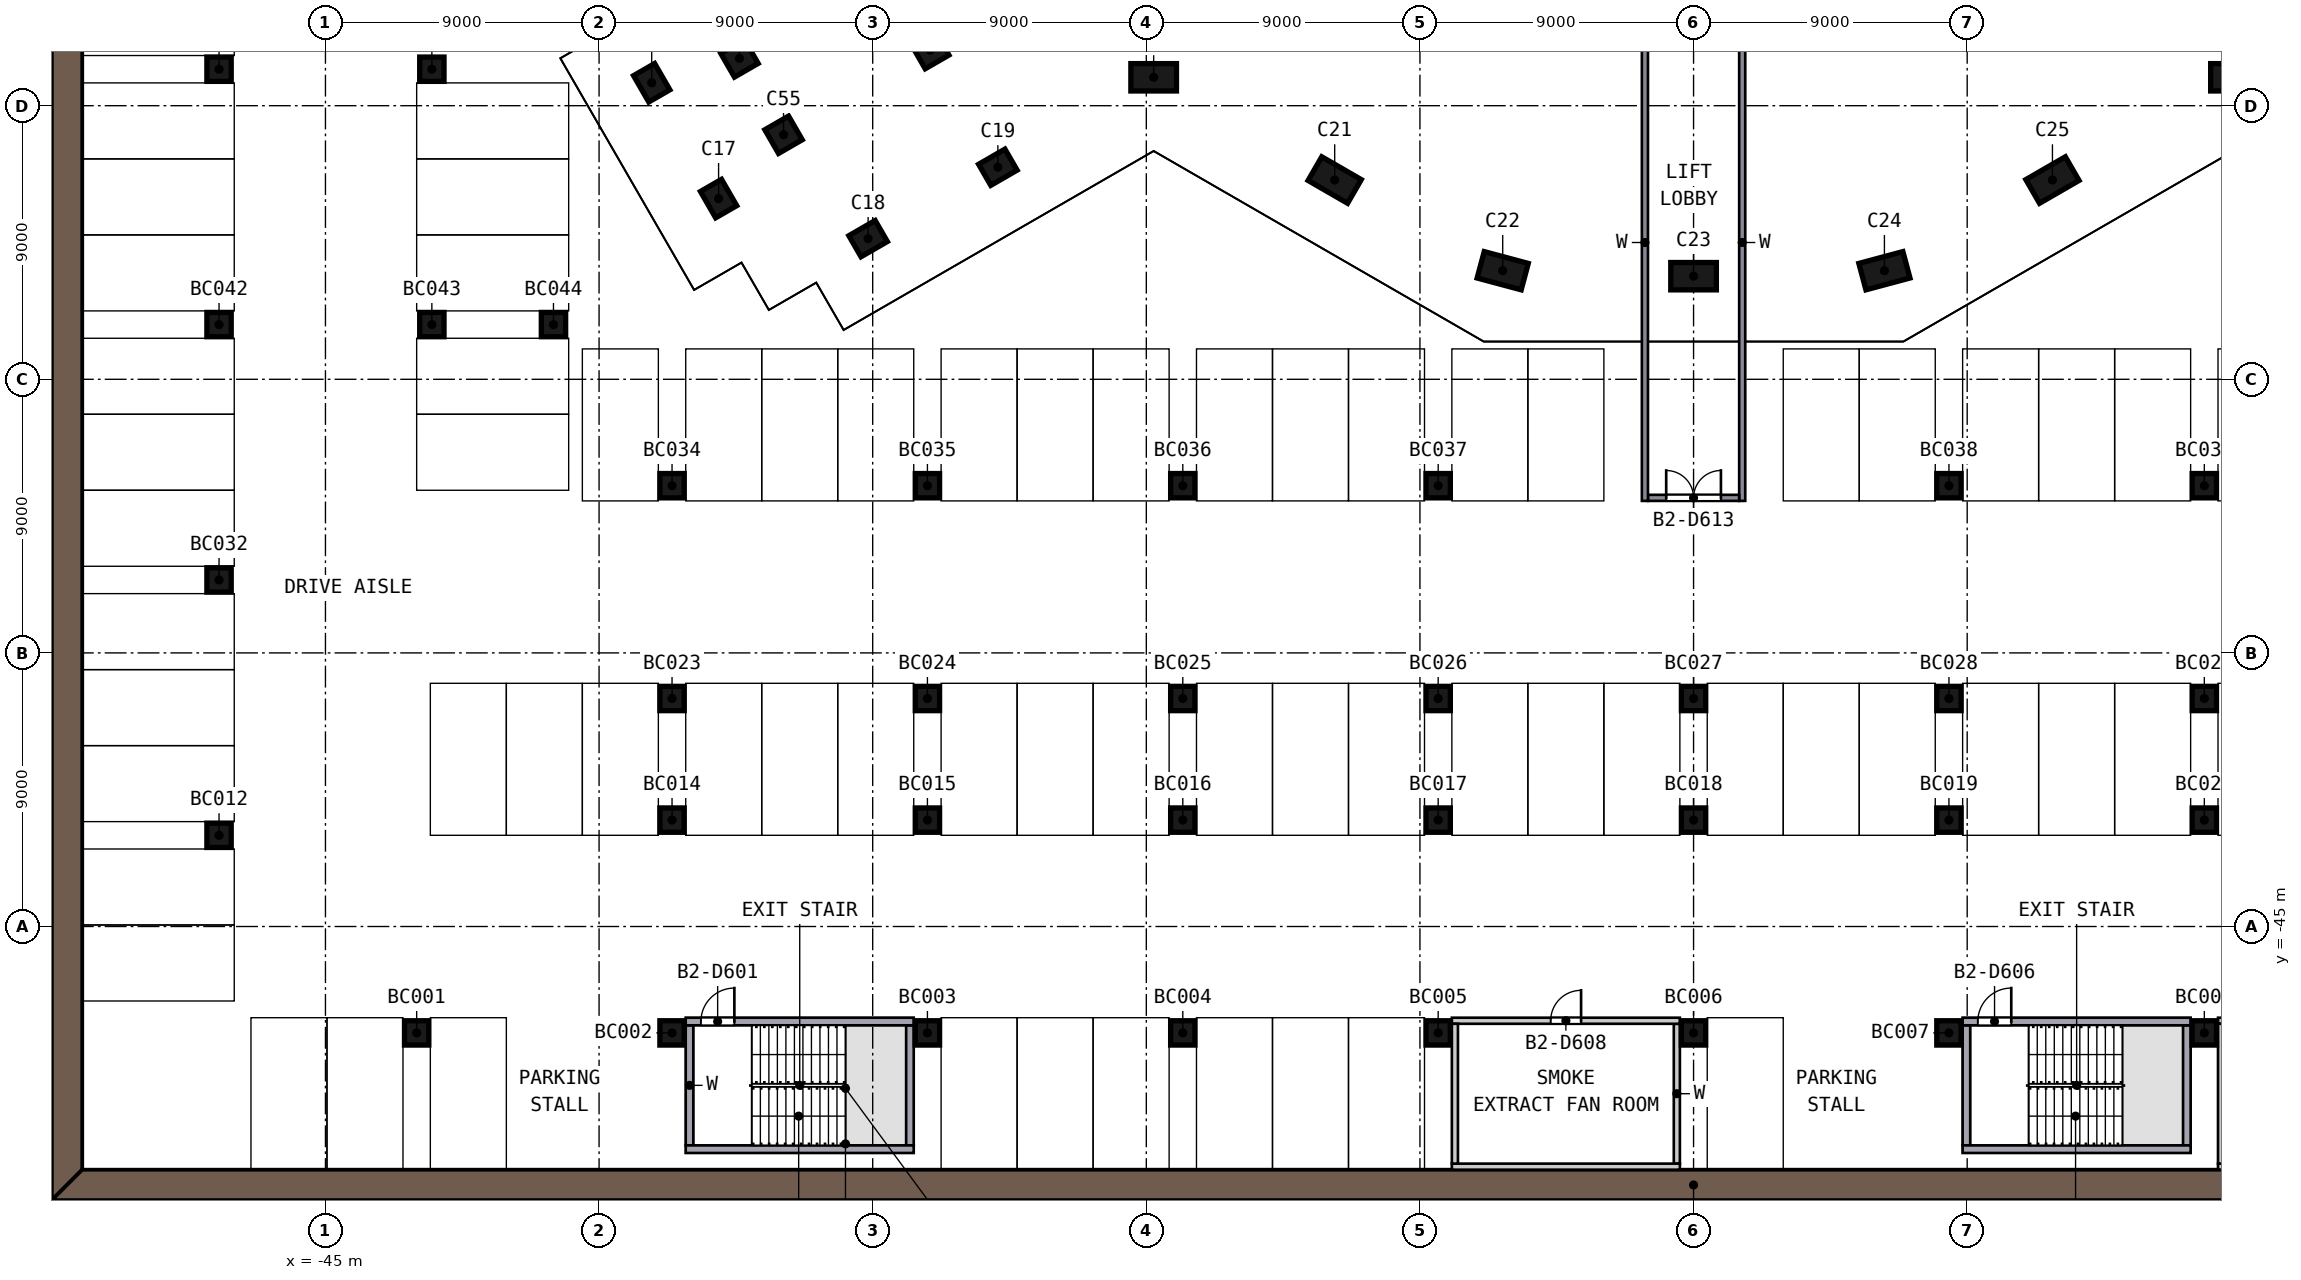
"""IFC4 building model, lengths in metres.
Left out: names, types, materials, properties, quantities, classifications, styles, units other than length and angle.
Written with IfcOpenShell. Run it as: python <this file> out.ifc"""

import sys

from ifc_helpers import new_model, si_unit, direction, frame, frame_2d, origin, origin_2d, place, context, subcontext, project, spatial, polyline, rectangle, outline, extrude, element, fill, save


model = new_model("IFC4")
c1 = context("Model", 3, precision=1e-05, world=origin(), true_north=direction((0.0, 1.0)))
c2 = subcontext(c1, "Body", "Model", "MODEL_VIEW")
j1 = project(units=[si_unit("LENGTHUNIT", "METRE"), si_unit("PLANEANGLEUNIT", "RADIAN")], contexts=[c1])
p1 = place(None, origin())
s1 = spatial("IfcSite", under=j1, at=p1, CompositionType="ELEMENT")
p2 = place(p1, origin())
s2 = spatial("IfcBuilding", under=s1, at=p2, CompositionType="ELEMENT")
p3 = place(p2, frame((0.0, 0.0, -7.8)))
s3 = spatial("IfcBuildingStorey", under=s2, at=p3, CompositionType="ELEMENT", Elevation=-7.8)
for number, where, z_axis, x_axis in (
    (1, (-34.269, -17.245, 0.0), (0.0, 0.0, 1.0), (0.5, -0.866, 0.0)),
    (2, (-32.069, -21.055, 0.0), (0.0, 0.0, 1.0), (0.5, -0.866, 0.0)),
    (3, (-27.151, -22.373, 0.0), (0.0, 0.0, 1.0), (0.866, 0.5, 0.0)),
    (4, (-22.883, -20.024, 0.0), (0.0, 0.0, 1.0), (0.866, 0.5, 0.0)),
):
    element("IfcColumn", number, at=place(p3, frame(where, z_axis=z_axis, x_axis=x_axis)), inside=s3, PredefinedType="COLUMN", context=c2, shape_type="SweptSolid", body=[
        extrude(rectangle(XDim=1.0, YDim=0.8, at=origin_2d()), origin(), (0.0, 0.0, 1.0), 3.45),
    ])
for number, where, z_axis, x_axis in (
    (5, (-17.758, -17.065, 0.0), (0.0, 0.0, 1.0), (-1.0, 0.0, 0.0)),
    (6, (-11.804, -20.445, 0.0), (0.0, 0.0, 1.0), (0.866, -0.5, 0.0)),
    (7, (-6.278, -23.428, 0.0), (0.0, 0.0, 1.0), (-0.966, 0.259, 0.0)),
    (8, (0.0, -23.608, 0.0), (0.0, 0.0, 1.0), (1.0, 0.0, 0.0)),
    (9, (6.278, -23.428, 0.0), (0.0, 0.0, 1.0), (-0.966, -0.259, 0.0)),
    (10, (11.804, -20.445, 0.0), (0.0, 0.0, 1.0), (0.866, 0.5, 0.0)),
    (11, (17.758, -17.065, 0.0), (0.0, 0.0, 1.0), (-1.0, 0.0, 0.0)),
):
    element("IfcColumn", number, at=place(p3, frame(where, z_axis=z_axis, x_axis=x_axis)), inside=s3, PredefinedType="COLUMN", context=c2, shape_type="SweptSolid", body=[
        extrude(rectangle(XDim=1.5, YDim=0.9, at=origin_2d()), origin(), (0.0, 0.0, 1.0), 3.45),
    ])
for number, where, z_axis, x_axis in (
    (12, (-25.108, -16.17, 0.0), (0.0, 0.0, 1.0), (-0.866, -0.5, 0.0)),
    (13, (-31.382, -16.444, 0.0), (0.0, 0.0, 1.0), (-0.866, -0.5, 0.0)),
    (14, (-29.932, -18.956, 0.0), (0.0, 0.0, 1.0), (-0.866, -0.5, 0.0)),
):
    element("IfcColumn", number, at=place(p3, frame(where, z_axis=z_axis, x_axis=x_axis)), inside=s3, PredefinedType="COLUMN", context=c2, shape_type="SweptSolid", body=[
        extrude(rectangle(XDim=0.9, YDim=0.9, at=origin_2d()), origin(), (0.0, 0.0, 1.0), 3.45),
    ])
p4 = place(p3, origin())
e15 = element("IfcWall", 15, at=p4, inside=s3, PredefinedType="SOLIDWALL", context=c2, shape_type="SweptSolid", body=[
    extrude(outline(polyline([(-54.0, 54.0), (-54.0, -54.0), (-53.0, -53.0), (-53.0, 53.0), (-54.0, 54.0)])), origin(), (0.0, 0.0, 1.0), 3.9),
])
p5 = place(p3, origin())
e16 = element("IfcWall", 16, at=p5, inside=s3, PredefinedType="SOLIDWALL", context=c2, shape_type="SweptSolid", body=[
    extrude(outline(polyline([(-54.0, -54.0), (54.0, -54.0), (53.0, -53.0), (-53.0, -53.0), (-54.0, -54.0)])), origin(), (0.0, 0.0, 1.0), 3.9),
])
for number, where, z_axis, x_axis in (
    (17, (-42.0, -48.5, 0.0), (0.0, 0.0, 1.0), (1.0, 0.0, 0.0)),
    (18, (-33.6, -48.5, 0.0), (0.0, 0.0, 1.0), (1.0, 0.0, 0.0)),
    (19, (-25.2, -48.5, 0.0), (0.0, 0.0, 1.0), (1.0, 0.0, 0.0)),
    (20, (-16.8, -48.5, 0.0), (0.0, 0.0, 1.0), (1.0, 0.0, 0.0)),
    (21, (-8.4, -48.5, 0.0), (0.0, 0.0, 1.0), (1.0, 0.0, 0.0)),
    (22, (0.0, -48.5, 0.0), (0.0, 0.0, 1.0), (1.0, 0.0, 0.0)),
    (23, (8.4, -48.5, 0.0), (0.0, 0.0, 1.0), (1.0, 0.0, 0.0)),
    (24, (16.8, -48.5, 0.0), (0.0, 0.0, 1.0), (1.0, 0.0, 0.0)),
    (25, (-48.5, -42.0, 0.0), (0.0, 0.0, 1.0), (1.0, 0.0, 0.0)),
    (26, (-33.6, -41.5, 0.0), (0.0, 0.0, 1.0), (1.0, 0.0, 0.0)),
    (27, (-25.2, -41.5, 0.0), (0.0, 0.0, 1.0), (1.0, 0.0, 0.0)),
    (28, (-16.8, -41.5, 0.0), (0.0, 0.0, 1.0), (1.0, 0.0, 0.0)),
    (29, (-8.4, -41.5, 0.0), (0.0, 0.0, 1.0), (1.0, 0.0, 0.0)),
    (30, (0.0, -41.5, 0.0), (0.0, 0.0, 1.0), (1.0, 0.0, 0.0)),
    (31, (8.4, -41.5, 0.0), (0.0, 0.0, 1.0), (1.0, 0.0, 0.0)),
    (32, (16.8, -41.5, 0.0), (0.0, 0.0, 1.0), (1.0, 0.0, 0.0)),
    (33, (-33.6, -37.5, 0.0), (0.0, 0.0, 1.0), (1.0, 0.0, 0.0)),
    (34, (-25.2, -37.5, 0.0), (0.0, 0.0, 1.0), (1.0, 0.0, 0.0)),
    (35, (-16.8, -37.5, 0.0), (0.0, 0.0, 1.0), (1.0, 0.0, 0.0)),
    (36, (-8.4, -37.5, 0.0), (0.0, 0.0, 1.0), (1.0, 0.0, 0.0)),
    (37, (0.0, -37.5, 0.0), (0.0, 0.0, 1.0), (1.0, 0.0, 0.0)),
    (38, (8.4, -37.5, 0.0), (0.0, 0.0, 1.0), (1.0, 0.0, 0.0)),
    (39, (16.8, -37.5, 0.0), (0.0, 0.0, 1.0), (1.0, 0.0, 0.0)),
    (40, (-48.5, -33.6, 0.0), (0.0, 0.0, 1.0), (1.0, 0.0, 0.0)),
    (41, (-33.6, -30.5, 0.0), (0.0, 0.0, 1.0), (1.0, 0.0, 0.0)),
    (42, (-25.2, -30.5, 0.0), (0.0, 0.0, 1.0), (1.0, 0.0, 0.0)),
    (43, (-16.8, -30.5, 0.0), (0.0, 0.0, 1.0), (1.0, 0.0, 0.0)),
    (44, (-8.4, -30.5, 0.0), (0.0, 0.0, 1.0), (1.0, 0.0, 0.0)),
    (45, (8.4, -30.5, 0.0), (0.0, 0.0, 1.0), (1.0, 0.0, 0.0)),
    (46, (16.8, -30.5, 0.0), (0.0, 0.0, 1.0), (1.0, 0.0, 0.0)),
    (47, (-48.5, -25.2, 0.0), (0.0, 0.0, 1.0), (1.0, 0.0, 0.0)),
    (48, (-41.5, -25.2, 0.0), (0.0, 0.0, 1.0), (1.0, 0.0, 0.0)),
    (49, (-37.5, -25.2, 0.0), (0.0, 0.0, 1.0), (1.0, 0.0, 0.0)),
    (50, (-48.5, -16.8, 0.0), (0.0, 0.0, 1.0), (1.0, 0.0, 0.0)),
    (51, (-41.5, -16.8, 0.0), (0.0, 0.0, 1.0), (1.0, 0.0, 0.0)),
):
    element("IfcColumn", number, at=place(p3, frame(where, z_axis=z_axis, x_axis=x_axis)), inside=s3, PredefinedType="COLUMN", context=c2, shape_type="SweptSolid", body=[
        extrude(rectangle(XDim=0.8, YDim=0.8, at=origin_2d()), origin(), (0.0, 0.0, 1.0), 3.9),
    ])
p6 = place(p3, frame((-33.15, -48.125, 0.0), z_axis=(0.0, 0.0, 1.0), x_axis=(1.0, 0.0, 0.0)))
e52 = element("IfcWall", 52, at=p6, inside=s3, PredefinedType="SOLIDWALL", context=c2, shape_type="SweptSolid", body=[
    extrude(rectangle(XDim=7.5, YDim=0.25, at=frame_2d((3.75, 0.0))), origin(), (0.0, 0.0, 1.0), 3.9),
])
p7 = place(p6, frame((0.5, 0.0, 0.0)))
e53 = element("IfcOpeningElement", 53, at=p7, cuts=e52, PredefinedType="OPENING", context=c2, shape_type="SweptSolid", body=[
    extrude(rectangle(XDim=1.1, YDim=2.1, at=frame_2d((0.55, 1.05))), frame((0.0, 0.135, 0.0), z_axis=(0.0, -1.0, 0.0), x_axis=(1.0, 0.0, 0.0)), (0.0, 0.0, 1.0), 0.27),
])
p8 = place(p3, frame((-33.15, -52.325, 0.0), z_axis=(0.0, 0.0, 1.0), x_axis=(1.0, 0.0, 0.0)))
e54 = element("IfcWall", 54, at=p8, inside=s3, PredefinedType="SOLIDWALL", context=c2, shape_type="SweptSolid", body=[
    extrude(rectangle(XDim=7.5, YDim=0.25, at=frame_2d((3.75, 0.0))), origin(), (0.0, 0.0, 1.0), 3.9),
])
for number, where, z_axis, x_axis in (
    (55, (-33.025, -52.2, 0.0), (0.0, 0.0, 1.0), (0.0, 1.0, 0.0)),
    (56, (-25.775, -52.2, 0.0), (0.0, 0.0, 1.0), (0.0, 1.0, 0.0)),
):
    element("IfcWall", number, at=place(p3, frame(where, z_axis=z_axis, x_axis=x_axis)), inside=s3, PredefinedType="SOLIDWALL", context=c2, shape_type="SweptSolid", body=[
        extrude(rectangle(XDim=3.95, YDim=0.25, at=frame_2d((1.975, 0.0))), origin(), (0.0, 0.0, 1.0), 3.9),
    ])
p9 = place(p3, frame((8.85, -48.125, 0.0), z_axis=(0.0, 0.0, 1.0), x_axis=(1.0, 0.0, 0.0)))
e57 = element("IfcWall", 57, at=p9, inside=s3, PredefinedType="SOLIDWALL", context=c2, shape_type="SweptSolid", body=[
    extrude(rectangle(XDim=7.5, YDim=0.25, at=frame_2d((3.75, 0.0))), origin(), (0.0, 0.0, 1.0), 3.9),
])
p10 = place(p9, frame((0.5, 0.0, 0.0)))
e58 = element("IfcOpeningElement", 58, at=p10, cuts=e57, PredefinedType="OPENING", context=c2, shape_type="SweptSolid", body=[
    extrude(rectangle(XDim=1.1, YDim=2.1, at=frame_2d((0.55, 1.05))), frame((0.0, 0.135, 0.0), z_axis=(0.0, -1.0, 0.0), x_axis=(1.0, 0.0, 0.0)), (0.0, 0.0, 1.0), 0.27),
])
p11 = place(p3, frame((8.85, -52.325, 0.0), z_axis=(0.0, 0.0, 1.0), x_axis=(1.0, 0.0, 0.0)))
e59 = element("IfcWall", 59, at=p11, inside=s3, PredefinedType="SOLIDWALL", context=c2, shape_type="SweptSolid", body=[
    extrude(rectangle(XDim=7.5, YDim=0.25, at=frame_2d((3.75, 0.0))), origin(), (0.0, 0.0, 1.0), 3.9),
])
for number, where, z_axis, x_axis in (
    (60, (8.975, -52.2, 0.0), (0.0, 0.0, 1.0), (0.0, 1.0, 0.0)),
    (61, (16.225, -52.2, 0.0), (0.0, 0.0, 1.0), (0.0, 1.0, 0.0)),
):
    element("IfcWall", number, at=place(p3, frame(where, z_axis=z_axis, x_axis=x_axis)), inside=s3, PredefinedType="SOLIDWALL", context=c2, shape_type="SweptSolid", body=[
        extrude(rectangle(XDim=3.95, YDim=0.25, at=frame_2d((1.975, 0.0))), origin(), (0.0, 0.0, 1.0), 3.9),
    ])
p12 = place(p3, frame((-7.95, -48.1, 0.0), z_axis=(0.0, 0.0, 1.0), x_axis=(1.0, 0.0, 0.0)))
e62 = element("IfcWall", 62, at=p12, inside=s3, PredefinedType="PARTITIONING", context=c2, shape_type="SweptSolid", body=[
    extrude(rectangle(XDim=7.5, YDim=0.2, at=frame_2d((3.75, 0.0))), origin(), (0.0, 0.0, 1.0), 3.45),
])
p13 = place(p12, frame((3.25, 0.0, 0.0)))
e63 = element("IfcOpeningElement", 63, at=p13, cuts=e62, PredefinedType="OPENING", context=c2, shape_type="SweptSolid", body=[
    extrude(rectangle(XDim=1.0, YDim=2.1, at=frame_2d((0.5, 1.05))), frame((0.0, 0.11, 0.0), z_axis=(0.0, -1.0, 0.0), x_axis=(1.0, 0.0, 0.0)), (0.0, 0.0, 1.0), 0.22),
])
p14 = place(p3, frame((-7.95, -52.9, 0.0), z_axis=(0.0, 0.0, 1.0), x_axis=(1.0, 0.0, 0.0)))
e64 = element("IfcWall", 64, at=p14, inside=s3, PredefinedType="PARTITIONING", context=c2, shape_type="SweptSolid", body=[
    extrude(rectangle(XDim=7.5, YDim=0.2, at=frame_2d((3.75, 0.0))), origin(), (0.0, 0.0, 1.0), 3.45),
])
for number, where, z_axis, x_axis in (
    (65, (-7.85, -52.8, 0.0), (0.0, 0.0, 1.0), (0.0, 1.0, 0.0)),
    (66, (-0.55, -52.8, 0.0), (0.0, 0.0, 1.0), (0.0, 1.0, 0.0)),
):
    element("IfcWall", number, at=place(p3, frame(where, z_axis=z_axis, x_axis=x_axis)), inside=s3, PredefinedType="PARTITIONING", context=c2, shape_type="SweptSolid", body=[
        extrude(rectangle(XDim=4.6, YDim=0.2, at=frame_2d((2.3, 0.0))), origin(), (0.0, 0.0, 1.0), 3.45),
    ])
p15 = place(p3, frame((17.25, -48.1, 0.0), z_axis=(0.0, 0.0, 1.0), x_axis=(1.0, 0.0, 0.0)))
e67 = element("IfcWall", 67, at=p15, inside=s3, PredefinedType="PARTITIONING", context=c2, shape_type="SweptSolid", body=[
    extrude(rectangle(XDim=7.5, YDim=0.2, at=frame_2d((3.75, 0.0))), origin(), (0.0, 0.0, 1.0), 3.45),
])
p16 = place(p15, frame((3.25, 0.0, 0.0)))
e68 = element("IfcOpeningElement", 68, at=p16, cuts=e67, PredefinedType="OPENING", context=c2, shape_type="SweptSolid", body=[
    extrude(rectangle(XDim=1.0, YDim=2.1, at=frame_2d((0.5, 1.05))), frame((0.0, 0.11, 0.0), z_axis=(0.0, -1.0, 0.0), x_axis=(1.0, 0.0, 0.0)), (0.0, 0.0, 1.0), 0.22),
])
p17 = place(p3, frame((17.25, -52.9, 0.0), z_axis=(0.0, 0.0, 1.0), x_axis=(1.0, 0.0, 0.0)))
e69 = element("IfcWall", 69, at=p17, inside=s3, PredefinedType="PARTITIONING", context=c2, shape_type="SweptSolid", body=[
    extrude(rectangle(XDim=7.5, YDim=0.2, at=frame_2d((3.75, 0.0))), origin(), (0.0, 0.0, 1.0), 3.45),
])
p18 = place(p3, frame((17.35, -52.8, 0.0), z_axis=(0.0, 0.0, 1.0), x_axis=(0.0, 1.0, 0.0)))
e70 = element("IfcWall", 70, at=p18, inside=s3, PredefinedType="PARTITIONING", context=c2, shape_type="SweptSolid", body=[
    extrude(rectangle(XDim=4.6, YDim=0.2, at=frame_2d((2.3, 0.0))), origin(), (0.0, 0.0, 1.0), 3.45),
])
for number, where, z_axis, x_axis in (
    (71, (-1.6, -31.0, 0.0), (0.0, 0.0, 1.0), (0.0, 1.0, 0.0)),
    (72, (1.6, -31.0, 0.0), (0.0, 0.0, 1.0), (0.0, 1.0, 0.0)),
):
    element("IfcWall", number, at=place(p3, frame(where, z_axis=z_axis, x_axis=x_axis)), inside=s3, PredefinedType="PARTITIONING", context=c2, shape_type="SweptSolid", body=[
        extrude(rectangle(XDim=17.0, YDim=0.2, at=frame_2d((8.5, 0.0))), origin(), (0.0, 0.0, 1.0), 3.45),
    ])
p19 = place(p3, frame((-1.5, -30.9, 0.0), z_axis=(0.0, 0.0, 1.0), x_axis=(1.0, 0.0, 0.0)))
e73 = element("IfcWall", 73, at=p19, inside=s3, PredefinedType="PARTITIONING", context=c2, shape_type="SweptSolid", body=[
    extrude(rectangle(XDim=3.0, YDim=0.2, at=frame_2d((1.5, 0.0))), origin(), (0.0, 0.0, 1.0), 3.45),
])
p20 = place(p19, frame((0.6, 0.0, 0.0)))
e74 = element("IfcOpeningElement", 74, at=p20, cuts=e73, PredefinedType="OPENING", context=c2, shape_type="SweptSolid", body=[
    extrude(rectangle(XDim=1.8, YDim=2.1, at=frame_2d((0.9, 1.05))), frame((0.0, 0.11, 0.0), z_axis=(0.0, -1.0, 0.0), x_axis=(1.0, 0.0, 0.0)), (0.0, 0.0, 1.0), 0.22),
])
p21 = place(p7, origin())
e75 = element("IfcDoor", 75, at=p21, inside=s3, OperationType="SINGLE_SWING_RIGHT", PredefinedType="DOOR", context=c2, shape_type="SweptSolid", body=[
    extrude(rectangle(XDim=1.1, YDim=2.1, at=frame_2d((0.55, 1.05))), frame((0.0, 0.025, 0.0), z_axis=(0.0, -1.0, 0.0), x_axis=(1.0, 0.0, 0.0)), (0.0, 0.0, 1.0), 0.05),
])
fill(e53, e75)
p22 = place(p10, origin())
e76 = element("IfcDoor", 76, at=p22, inside=s3, OperationType="SINGLE_SWING_RIGHT", PredefinedType="DOOR", context=c2, shape_type="SweptSolid", body=[
    extrude(rectangle(XDim=1.1, YDim=2.1, at=frame_2d((0.55, 1.05))), frame((0.0, 0.025, 0.0), z_axis=(0.0, -1.0, 0.0), x_axis=(1.0, 0.0, 0.0)), (0.0, 0.0, 1.0), 0.05),
])
fill(e58, e76)
p23 = place(p13, origin())
e77 = element("IfcDoor", 77, at=p23, inside=s3, OperationType="SINGLE_SWING_RIGHT", PredefinedType="DOOR", context=c2, shape_type="SweptSolid", body=[
    extrude(rectangle(XDim=1.0, YDim=2.1, at=frame_2d((0.5, 1.05))), frame((0.0, 0.025, 0.0), z_axis=(0.0, -1.0, 0.0), x_axis=(1.0, 0.0, 0.0)), (0.0, 0.0, 1.0), 0.05),
])
fill(e63, e77)
p24 = place(p20, origin())
e78 = element("IfcDoor", 78, at=p24, inside=s3, OperationType="DOUBLE_DOOR_SINGLE_SWING", PredefinedType="DOOR", context=c2, shape_type="SweptSolid", body=[
    extrude(rectangle(XDim=1.8, YDim=2.1, at=frame_2d((0.9, 1.05))), frame((0.0, 0.025, 0.0), z_axis=(0.0, -1.0, 0.0), x_axis=(1.0, 0.0, 0.0)), (0.0, 0.0, 1.0), 0.05),
])
fill(e74, e78)
save(model, sys.argv[1])
